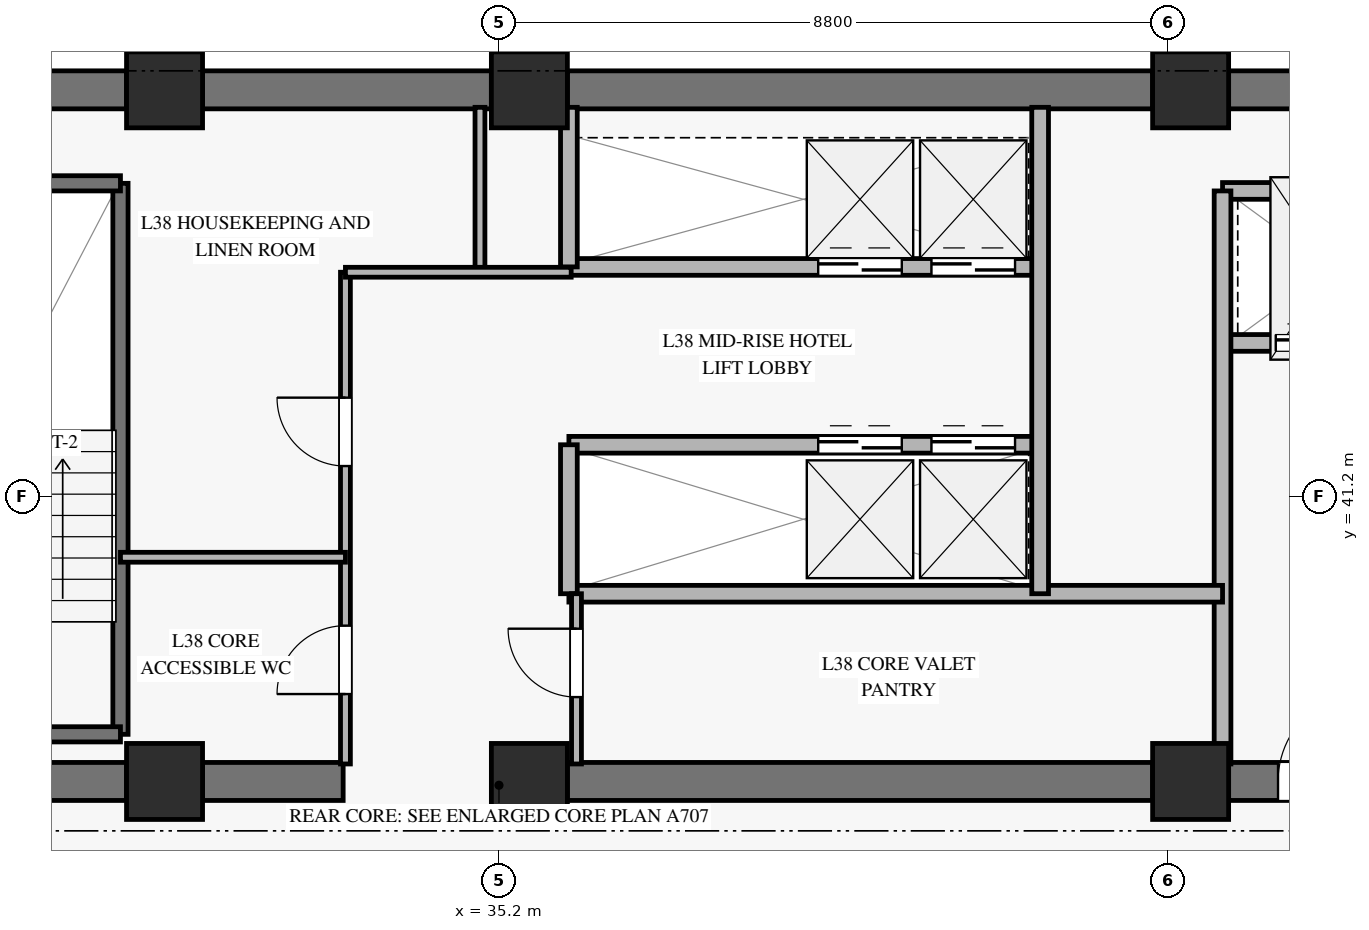
"""IFC4 building model, lengths in metres.
Left out: names, types, materials, properties, quantities, classifications, styles, units other than length and angle.
Written with IfcOpenShell. Run it as: python <this file> out.ifc"""

import sys

from ifc_helpers import new_model, si_unit, direction, frame, frame_2d, origin, origin_2d, place, context, subcontext, project, spatial, rectangle, extrude, source, transform, mapped, element, fill, save


model = new_model("IFC4")
c1 = context("Model", 3, precision=1e-05, world=origin(), true_north=direction((0.0, 1.0)))
c2 = subcontext(c1, "Body", "Model", "MODEL_VIEW")
j1 = project(units=[si_unit("LENGTHUNIT", "METRE"), si_unit("PLANEANGLEUNIT", "RADIAN")], contexts=[c1])
p1 = place(None, origin())
s1 = spatial("IfcSite", under=j1, at=p1, CompositionType="ELEMENT")
p2 = place(p1, origin())
s2 = spatial("IfcBuilding", under=s1, at=p2, CompositionType="ELEMENT")
p3 = place(p2, frame((0.0, 0.0, 156.2)))
s3 = spatial("IfcBuildingStorey", under=s2, at=p3, CompositionType="ELEMENT", Elevation=156.2)
m1 = source(origin(), c2, "Body", "SweptSolid", [
    extrude(rectangle(XDim=1.0, YDim=1.0, at=origin_2d()), origin(), (0.0, 0.0, 1.0), 3.27),
])
for number, where, z_axis, x_axis in (
    (1, (30.8, 37.45, 0.0), (0.0, 0.0, 1.0), (1.0, 0.0, 0.0)),
    (2, (30.8, 46.55, 0.0), (0.0, 0.0, 1.0), (1.0, 0.0, 0.0)),
    (3, (35.6, 37.45, 0.0), (0.0, 0.0, 1.0), (1.0, 0.0, 0.0)),
    (4, (35.6, 46.55, 0.0), (0.0, 0.0, 1.0), (1.0, 0.0, 0.0)),
    (5, (44.3, 37.45, 0.0), (0.0, 0.0, 1.0), (1.0, 0.0, 0.0)),
    (6, (44.3, 46.55, 0.0), (0.0, 0.0, 1.0), (1.0, 0.0, 0.0)),
):
    element("IfcColumn", number, at=place(p3, frame(where, z_axis=z_axis, x_axis=x_axis)), inside=s3, PredefinedType="PILASTER", context=c2, shape_type="MappedRepresentation", body=[
        mapped(m1, transform((0.0, 0.0, 0.0), x_axis=(1.0, 0.0, 0.0), y_axis=(0.0, 1.0, 0.0), z_axis=(0.0, 0.0, 1.0), scale=1.0)),
    ])
p4 = place(p3, frame((20.35, 46.55, 0.0), z_axis=(0.0, 0.0, 1.0), x_axis=(1.0, 0.0, 0.0)))
e7 = element("IfcWall", 7, at=p4, inside=s3, PredefinedType="SHEAR", context=c2, shape_type="SweptSolid", body=[
    extrude(rectangle(XDim=9.95, YDim=0.5, at=frame_2d((4.975, 0.0))), origin(), (0.0, 0.0, 1.0), 3.27),
])
p5 = place(p3, frame((31.3, 46.55, 0.0), z_axis=(0.0, 0.0, 1.0), x_axis=(1.0, 0.0, 0.0)))
e8 = element("IfcWall", 8, at=p5, inside=s3, PredefinedType="SHEAR", context=c2, shape_type="SweptSolid", body=[
    extrude(rectangle(XDim=3.8, YDim=0.5, at=frame_2d((1.9, 0.0))), origin(), (0.0, 0.0, 1.0), 3.27),
])
p6 = place(p3, frame((36.1, 46.55, 0.0), z_axis=(0.0, 0.0, 1.0), x_axis=(1.0, 0.0, 0.0)))
e9 = element("IfcWall", 9, at=p6, inside=s3, PredefinedType="SHEAR", context=c2, shape_type="SweptSolid", body=[
    extrude(rectangle(XDim=7.7, YDim=0.5, at=frame_2d((3.85, 0.0))), origin(), (0.0, 0.0, 1.0), 3.27),
])
p7 = place(p3, frame((44.8, 46.55, 0.0), z_axis=(0.0, 0.0, 1.0), x_axis=(1.0, 0.0, 0.0)))
e10 = element("IfcWall", 10, at=p7, inside=s3, PredefinedType="SHEAR", context=c2, shape_type="SweptSolid", body=[
    extrude(rectangle(XDim=5.25, YDim=0.5, at=frame_2d((2.625, 0.0))), origin(), (0.0, 0.0, 1.0), 3.27),
])
p8 = place(p3, frame((20.35, 37.45, 0.0), z_axis=(0.0, 0.0, 1.0), x_axis=(1.0, 0.0, 0.0)))
e11 = element("IfcWall", 11, at=p8, inside=s3, PredefinedType="SHEAR", context=c2, shape_type="SweptSolid", body=[
    extrude(rectangle(XDim=9.95, YDim=0.5, at=frame_2d((4.975, 0.0))), origin(), (0.0, 0.0, 1.0), 3.27),
])
p9 = place(p8, frame((4.2, 0.0, 0.0)))
e12 = element("IfcOpeningElement", 12, at=p9, cuts=e11, PredefinedType="OPENING", context=c2, shape_type="SweptSolid", body=[
    extrude(rectangle(XDim=1.2, YDim=2.15, at=frame_2d((0.6, 1.075))), frame((0.0, 0.26, 0.0), z_axis=(0.0, -1.0, 0.0), x_axis=(1.0, 0.0, 0.0)), (0.0, 0.0, 1.0), 0.52),
])
p10 = place(p3, frame((31.3, 37.45, 0.0), z_axis=(0.0, 0.0, 1.0), x_axis=(1.0, 0.0, 0.0)))
e13 = element("IfcWall", 13, at=p10, inside=s3, PredefinedType="SHEAR", context=c2, shape_type="SweptSolid", body=[
    extrude(rectangle(XDim=1.85, YDim=0.5, at=frame_2d((0.925, 0.0))), origin(), (0.0, 0.0, 1.0), 3.27),
])
p11 = place(p3, frame((36.1, 37.45, 0.0), z_axis=(0.0, 0.0, 1.0), x_axis=(1.0, 0.0, 0.0)))
e14 = element("IfcWall", 14, at=p11, inside=s3, PredefinedType="SHEAR", context=c2, shape_type="SweptSolid", body=[
    extrude(rectangle(XDim=7.7, YDim=0.5, at=frame_2d((3.85, 0.0))), origin(), (0.0, 0.0, 1.0), 3.27),
])
p12 = place(p3, frame((44.8, 37.45, 0.0), z_axis=(0.0, 0.0, 1.0), x_axis=(1.0, 0.0, 0.0)))
e15 = element("IfcWall", 15, at=p12, inside=s3, PredefinedType="SHEAR", context=c2, shape_type="SweptSolid", body=[
    extrude(rectangle(XDim=5.25, YDim=0.5, at=frame_2d((2.625, 0.0))), origin(), (0.0, 0.0, 1.0), 3.27),
])
p13 = place(p12, frame((0.65, 0.0, 0.0)))
e16 = element("IfcOpeningElement", 16, at=p13, cuts=e15, PredefinedType="OPENING", context=c2, shape_type="SweptSolid", body=[
    extrude(rectangle(XDim=1.2, YDim=2.15, at=frame_2d((0.6, 1.075))), frame((0.0, 0.26, 0.0), z_axis=(0.0, -1.0, 0.0), x_axis=(1.0, 0.0, 0.0)), (0.0, 0.0, 1.0), 0.52),
])
p14 = place(p3, frame((30.22, 38.07, 0.0), z_axis=(0.0, 0.0, 1.0), x_axis=(0.0, 1.0, 0.0)))
e17 = element("IfcWall", 17, at=p14, inside=s3, PredefinedType="SOLIDWALL", context=c2, shape_type="SweptSolid", body=[
    extrude(rectangle(XDim=7.25, YDim=0.2, at=frame_2d((3.625, 0.0))), origin(), (0.0, 0.0, 1.0), 3.5),
])
for number, where, z_axis, x_axis in (
    (18, (27.14, 45.32, 0.0), (0.0, 0.0, 1.0), (1.0, 0.0, 0.0)),
    (19, (27.14, 38.07, 0.0), (0.0, 0.0, 1.0), (1.0, 0.0, 0.0)),
):
    element("IfcWall", number, at=place(p3, frame(where, z_axis=z_axis, x_axis=x_axis)), inside=s3, PredefinedType="SOLIDWALL", context=c2, shape_type="SweptSolid", body=[
        extrude(rectangle(XDim=3.08, YDim=0.2, at=frame_2d((1.54, 0.0))), origin(), (0.0, 0.0, 1.0), 3.5),
    ])
p15 = place(p3, frame((44.72, 43.22, 0.0), z_axis=(0.0, 0.0, 1.0), x_axis=(1.0, 0.0, 0.0)))
e20 = element("IfcWall", 20, at=p15, inside=s3, PredefinedType="SOLIDWALL", context=c2, shape_type="SweptSolid", body=[
    extrude(rectangle(XDim=2.72, YDim=0.22, at=frame_2d((1.36, 0.0))), origin(), (0.0, 0.0, 1.0), 3.27),
])
p16 = place(p15, frame((0.7, 0.0, 0.0)))
e21 = element("IfcOpeningElement", 21, at=p16, cuts=e20, PredefinedType="OPENING", context=c2, shape_type="SweptSolid", body=[
    extrude(rectangle(XDim=1.1, YDim=2.2, at=frame_2d((0.55, 1.1))), frame((0.0, 0.12, 0.0), z_axis=(0.0, -1.0, 0.0), x_axis=(1.0, 0.0, 0.0)), (0.0, 0.0, 1.0), 0.24),
])
p17 = place(p3, frame((44.72, 45.22, 0.0), z_axis=(0.0, 0.0, 1.0), x_axis=(1.0, 0.0, 0.0)))
e22 = element("IfcWall", 22, at=p17, inside=s3, PredefinedType="SOLIDWALL", context=c2, shape_type="SweptSolid", body=[
    extrude(rectangle(XDim=2.72, YDim=0.22, at=frame_2d((1.36, 0.0))), origin(), (0.0, 0.0, 1.0), 3.27),
])
p18 = place(p3, frame((44.72, 37.68, 0.0), z_axis=(0.0, 0.0, 1.0), x_axis=(0.0, 1.0, 0.0)))
e23 = element("IfcWall", 23, at=p18, inside=s3, PredefinedType="SOLIDWALL", context=c2, shape_type="SweptSolid", body=[
    extrude(rectangle(XDim=7.54, YDim=0.22, at=frame_2d((3.77, 0.0))), origin(), (0.0, 0.0, 1.0), 3.27),
])
p19 = place(p3, frame((36.12, 44.22, 0.0), z_axis=(0.0, 0.0, 1.0), x_axis=(1.0, 0.0, 0.0)))
e24 = element("IfcWall", 24, at=p19, inside=s3, PredefinedType="SOLIDWALL", context=c2, shape_type="SweptSolid", body=[
    extrude(rectangle(XDim=6.2, YDim=0.22, at=frame_2d((3.1, 0.0))), origin(), (0.0, 0.0, 1.0), 3.27),
])
p20 = place(p19, frame((3.28, 0.0, 0.0)))
e25 = element("IfcOpeningElement", 25, at=p20, cuts=e24, PredefinedType="OPENING", context=c2, shape_type="SweptSolid", body=[
    extrude(rectangle(XDim=1.1, YDim=2.2, at=frame_2d((0.55, 1.1))), frame((0.0, 0.12, 0.0), z_axis=(0.0, -1.0, 0.0), x_axis=(1.0, 0.0, 0.0)), (0.0, 0.0, 1.0), 0.24),
])
p21 = place(p19, frame((4.77, 0.0, 0.0)))
e26 = element("IfcOpeningElement", 26, at=p21, cuts=e24, PredefinedType="OPENING", context=c2, shape_type="SweptSolid", body=[
    extrude(rectangle(XDim=1.1, YDim=2.2, at=frame_2d((0.55, 1.1))), frame((0.0, 0.12, 0.0), z_axis=(0.0, -1.0, 0.0), x_axis=(1.0, 0.0, 0.0)), (0.0, 0.0, 1.0), 0.24),
])
p22 = place(p3, frame((36.12, 41.88, 0.0), z_axis=(0.0, 0.0, 1.0), x_axis=(1.0, 0.0, 0.0)))
e27 = element("IfcWall", 27, at=p22, inside=s3, PredefinedType="SOLIDWALL", context=c2, shape_type="SweptSolid", body=[
    extrude(rectangle(XDim=6.2, YDim=0.22, at=frame_2d((3.1, 0.0))), origin(), (0.0, 0.0, 1.0), 3.27),
])
p23 = place(p22, frame((3.28, 0.0, 0.0)))
e28 = element("IfcOpeningElement", 28, at=p23, cuts=e27, PredefinedType="OPENING", context=c2, shape_type="SweptSolid", body=[
    extrude(rectangle(XDim=1.1, YDim=2.2, at=frame_2d((0.55, 1.1))), frame((0.0, 0.12, 0.0), z_axis=(0.0, -1.0, 0.0), x_axis=(1.0, 0.0, 0.0)), (0.0, 0.0, 1.0), 0.24),
])
p24 = place(p22, frame((4.77, 0.0, 0.0)))
e29 = element("IfcOpeningElement", 29, at=p24, cuts=e27, PredefinedType="OPENING", context=c2, shape_type="SweptSolid", body=[
    extrude(rectangle(XDim=1.1, YDim=2.2, at=frame_2d((0.55, 1.1))), frame((0.0, 0.12, 0.0), z_axis=(0.0, -1.0, 0.0), x_axis=(1.0, 0.0, 0.0)), (0.0, 0.0, 1.0), 0.24),
])
p25 = place(p3, frame((36.12, 39.92, 0.0), z_axis=(0.0, 0.0, 1.0), x_axis=(1.0, 0.0, 0.0)))
e30 = element("IfcWall", 30, at=p25, inside=s3, PredefinedType="SOLIDWALL", context=c2, shape_type="SweptSolid", body=[
    extrude(rectangle(XDim=8.6, YDim=0.22, at=frame_2d((4.3, 0.0))), origin(), (0.0, 0.0, 1.0), 2.555),
])
p26 = place(p3, frame((42.32, 39.92, 0.0), z_axis=(0.0, 0.0, 1.0), x_axis=(0.0, 1.0, 0.0)))
e31 = element("IfcWall", 31, at=p26, inside=s3, PredefinedType="SOLIDWALL", context=c2, shape_type="SweptSolid", body=[
    extrude(rectangle(XDim=6.4, YDim=0.22, at=frame_2d((3.2, 0.0))), origin(), (0.0, 0.0, 1.0), 3.27),
])
p27 = place(p3, frame((36.12, 39.92, 0.0), z_axis=(0.0, 0.0, 1.0), x_axis=(0.0, 1.0, 0.0)))
e32 = element("IfcWall", 32, at=p27, inside=s3, PredefinedType="SOLIDWALL", context=c2, shape_type="SweptSolid", body=[
    extrude(rectangle(XDim=1.96, YDim=0.22, at=frame_2d((0.98, 0.0))), origin(), (0.0, 0.0, 1.0), 3.27),
])
p28 = place(p3, frame((36.12, 44.22, 0.0), z_axis=(0.0, 0.0, 1.0), x_axis=(0.0, 1.0, 0.0)))
e33 = element("IfcWall", 33, at=p28, inside=s3, PredefinedType="SOLIDWALL", context=c2, shape_type="SweptSolid", body=[
    extrude(rectangle(XDim=2.1, YDim=0.22, at=frame_2d((1.05, 0.0))), origin(), (0.0, 0.0, 1.0), 3.27),
])
p29 = place(p3, frame((33.18, 37.68, 0.0), z_axis=(0.0, 0.0, 1.0), x_axis=(0.0, 1.0, 0.0)))
e34 = element("IfcWall", 34, at=p29, inside=s3, PredefinedType="PARTITIONING", context=c2, shape_type="SweptSolid", body=[
    extrude(rectangle(XDim=6.47, YDim=0.13, at=frame_2d((3.235, 0.0))), origin(), (0.0, 0.0, 1.0), 2.355),
])
p30 = place(p29, frame((0.92, 0.0, 0.0)))
e35 = element("IfcOpeningElement", 35, at=p30, cuts=e34, PredefinedType="OPENING", context=c2, shape_type="SweptSolid", body=[
    extrude(rectangle(XDim=0.9, YDim=2.1, at=frame_2d((0.45, 1.05))), frame((0.0, 0.075, 0.0), z_axis=(0.0, -1.0, 0.0), x_axis=(1.0, 0.0, 0.0)), (0.0, 0.0, 1.0), 0.15),
])
p31 = place(p29, frame((3.92, 0.0, 0.0)))
e36 = element("IfcOpeningElement", 36, at=p31, cuts=e34, PredefinedType="OPENING", context=c2, shape_type="SweptSolid", body=[
    extrude(rectangle(XDim=0.9, YDim=2.1, at=frame_2d((0.45, 1.05))), frame((0.0, 0.075, 0.0), z_axis=(0.0, -1.0, 0.0), x_axis=(1.0, 0.0, 0.0)), (0.0, 0.0, 1.0), 0.15),
])
p32 = place(p3, frame((34.95, 44.15, 0.0), z_axis=(0.0, 0.0, 1.0), x_axis=(0.0, 1.0, 0.0)))
e37 = element("IfcWall", 37, at=p32, inside=s3, PredefinedType="PARTITIONING", context=c2, shape_type="SweptSolid", body=[
    extrude(rectangle(XDim=2.17, YDim=0.13, at=frame_2d((1.085, 0.0))), origin(), (0.0, 0.0, 1.0), 3.27),
])
p33 = place(p3, frame((33.18, 44.15, 0.0), z_axis=(0.0, 0.0, 1.0), x_axis=(1.0, 0.0, 0.0)))
e38 = element("IfcWall", 38, at=p33, inside=s3, PredefinedType="PARTITIONING", context=c2, shape_type="SweptSolid", body=[
    extrude(rectangle(XDim=2.97, YDim=0.13, at=frame_2d((1.485, 0.0))), origin(), (0.0, 0.0, 1.0), 2.555),
])
p34 = place(p3, frame((30.22, 40.4, 0.0), z_axis=(0.0, 0.0, 1.0), x_axis=(1.0, 0.0, 0.0)))
e39 = element("IfcWall", 39, at=p34, inside=s3, PredefinedType="PARTITIONING", context=c2, shape_type="SweptSolid", body=[
    extrude(rectangle(XDim=2.96, YDim=0.13, at=frame_2d((1.48, 0.0))), origin(), (0.0, 0.0, 1.0), 2.555),
])
p35 = place(p3, frame((36.22, 37.68, 0.0), z_axis=(0.0, 0.0, 1.0), x_axis=(0.0, 1.0, 0.0)))
e40 = element("IfcWall", 40, at=p35, inside=s3, PredefinedType="PARTITIONING", context=c2, shape_type="SweptSolid", body=[
    extrude(rectangle(XDim=2.24, YDim=0.13, at=frame_2d((1.12, 0.0))), origin(), (0.0, 0.0, 1.0), 3.27),
])
p36 = place(p35, frame((0.88, 0.0, 0.0)))
e41 = element("IfcOpeningElement", 41, at=p36, cuts=e40, PredefinedType="OPENING", context=c2, shape_type="SweptSolid", body=[
    extrude(rectangle(XDim=0.9, YDim=2.1, at=frame_2d((0.45, 1.05))), frame((0.0, 0.075, 0.0), z_axis=(0.0, -1.0, 0.0), x_axis=(1.0, 0.0, 0.0)), (0.0, 0.0, 1.0), 0.15),
])
m2 = source(origin(), c2, "Body", "SweptSolid", [
    extrude(rectangle(XDim=1.1, YDim=2.2, at=frame_2d((0.55, 1.1))), frame((0.0, 0.025, 0.0), z_axis=(0.0, -1.0, 0.0), x_axis=(1.0, 0.0, 0.0)), (0.0, 0.0, 1.0), 0.05),
])
p37 = place(p16, origin())
e42 = element("IfcDoor", 42, at=p37, inside=s3, OperationType="SLIDING_TO_LEFT", PredefinedType="DOOR", context=c2, shape_type="MappedRepresentation", body=[
    mapped(m2, transform((0.0, 0.0, 0.0), x_axis=(1.0, 0.0, 0.0), y_axis=(0.0, 1.0, 0.0), z_axis=(0.0, 0.0, 1.0), scale=1.0)),
])
fill(e21, e42)
m3 = source(origin(), c2, "Body", "SweptSolid", [
    extrude(rectangle(XDim=1.2, YDim=2.15, at=frame_2d((0.6, 1.075))), frame((0.0, 0.025, 0.0), z_axis=(0.0, -1.0, 0.0), x_axis=(1.0, 0.0, 0.0)), (0.0, 0.0, 1.0), 0.05),
])
p38 = place(p13, origin())
e43 = element("IfcDoor", 43, at=p38, inside=s3, OperationType="SINGLE_SWING_RIGHT", PredefinedType="DOOR", context=c2, shape_type="MappedRepresentation", body=[
    mapped(m3, transform((0.0, 0.0, 0.0), x_axis=(1.0, 0.0, 0.0), y_axis=(0.0, 1.0, 0.0), z_axis=(0.0, 0.0, 1.0), scale=1.0)),
])
fill(e16, e43)
p39 = place(p20, origin())
e44 = element("IfcDoor", 44, at=p39, inside=s3, OperationType="SLIDING_TO_LEFT", PredefinedType="DOOR", context=c2, shape_type="MappedRepresentation", body=[
    mapped(m2, transform((0.0, 0.0, 0.0), x_axis=(1.0, 0.0, 0.0), y_axis=(0.0, 1.0, 0.0), z_axis=(0.0, 0.0, 1.0), scale=1.0)),
])
fill(e25, e44)
p40 = place(p21, origin())
e45 = element("IfcDoor", 45, at=p40, inside=s3, OperationType="SLIDING_TO_LEFT", PredefinedType="DOOR", context=c2, shape_type="MappedRepresentation", body=[
    mapped(m2, transform((0.0, 0.0, 0.0), x_axis=(1.0, 0.0, 0.0), y_axis=(0.0, 1.0, 0.0), z_axis=(0.0, 0.0, 1.0), scale=1.0)),
])
fill(e26, e45)
p41 = place(p23, origin())
e46 = element("IfcDoor", 46, at=p41, inside=s3, OperationType="SLIDING_TO_LEFT", PredefinedType="DOOR", context=c2, shape_type="MappedRepresentation", body=[
    mapped(m2, transform((0.0, 0.0, 0.0), x_axis=(1.0, 0.0, 0.0), y_axis=(0.0, 1.0, 0.0), z_axis=(0.0, 0.0, 1.0), scale=1.0)),
])
fill(e28, e46)
p42 = place(p24, origin())
e47 = element("IfcDoor", 47, at=p42, inside=s3, OperationType="SLIDING_TO_LEFT", PredefinedType="DOOR", context=c2, shape_type="MappedRepresentation", body=[
    mapped(m2, transform((0.0, 0.0, 0.0), x_axis=(1.0, 0.0, 0.0), y_axis=(0.0, 1.0, 0.0), z_axis=(0.0, 0.0, 1.0), scale=1.0)),
])
fill(e29, e47)
m4 = source(origin(), c2, "Body", "SweptSolid", [
    extrude(rectangle(XDim=0.9, YDim=2.1, at=frame_2d((0.45, 1.05))), frame((0.0, 0.025, 0.0), z_axis=(0.0, -1.0, 0.0), x_axis=(1.0, 0.0, 0.0)), (0.0, 0.0, 1.0), 0.05),
])
p43 = place(p30, origin())
e48 = element("IfcDoor", 48, at=p43, inside=s3, OperationType="SINGLE_SWING_LEFT", PredefinedType="DOOR", context=c2, shape_type="MappedRepresentation", body=[
    mapped(m4, transform((0.0, 0.0, 0.0), x_axis=(1.0, 0.0, 0.0), y_axis=(0.0, 1.0, 0.0), z_axis=(0.0, 0.0, 1.0), scale=1.0)),
])
fill(e35, e48)
p44 = place(p31, origin())
e49 = element("IfcDoor", 49, at=p44, inside=s3, OperationType="SINGLE_SWING_RIGHT", PredefinedType="DOOR", context=c2, shape_type="MappedRepresentation", body=[
    mapped(m4, transform((0.0, 0.0, 0.0), x_axis=(1.0, 0.0, 0.0), y_axis=(0.0, 1.0, 0.0), z_axis=(0.0, 0.0, 1.0), scale=1.0)),
])
fill(e36, e49)
p45 = place(p36, origin())
e50 = element("IfcDoor", 50, at=p45, inside=s3, OperationType="SINGLE_SWING_RIGHT", PredefinedType="DOOR", context=c2, shape_type="MappedRepresentation", body=[
    mapped(m4, transform((0.0, 0.0, 0.0), x_axis=(1.0, 0.0, 0.0), y_axis=(0.0, 1.0, 0.0), z_axis=(0.0, 0.0, 1.0), scale=1.0)),
])
fill(e41, e50)
save(model, sys.argv[1])
